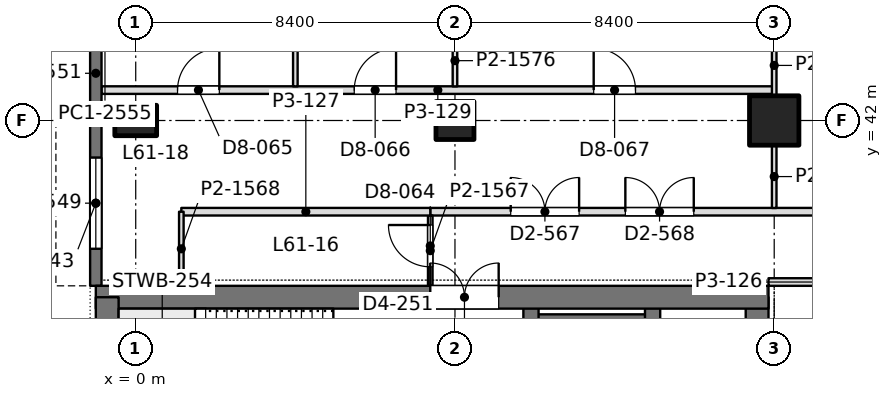
"""IFC4 building model, lengths in metres.
Left out: names, types, materials, properties, quantities, classifications, styles, units other than length and angle.
Written with IfcOpenShell. Run it as: python <this file> out.ifc"""

import sys

from ifc_helpers import new_model, si_unit, direction, frame, frame_2d, origin, origin_2d, place, context, subcontext, project, spatial, rectangle, extrude, element, fill, save


model = new_model("IFC4")
c1 = context("Model", 3, precision=1e-05, world=origin(), true_north=direction((0.0, 1.0)))
c2 = subcontext(c1, "Body", "Model", "MODEL_VIEW")
j1 = project(units=[si_unit("LENGTHUNIT", "METRE"), si_unit("PLANEANGLEUNIT", "RADIAN")], contexts=[c1])
p1 = place(None, origin())
s1 = spatial("IfcSite", under=j1, at=p1, CompositionType="ELEMENT")
p2 = place(p1, origin())
s2 = spatial("IfcBuilding", under=s1, at=p2, CompositionType="ELEMENT")
p3 = place(p2, frame((0.0, 0.0, 268.2)))
s3 = spatial("IfcBuildingStorey", under=s2, at=p3, CompositionType="ELEMENT", Elevation=268.2)
p4 = place(p3, frame((0.0, 42.0, 0.0), z_axis=(0.0, 0.0, 1.0), x_axis=(0.0, 1.0, 0.0)))
e1 = element("IfcColumn", 1, at=p4, inside=s3, PredefinedType="COLUMN", context=c2, shape_type="SweptSolid", body=[
    extrude(rectangle(XDim=0.8, YDim=1.1, at=origin_2d()), origin(), (0.0, 0.0, 1.0), 4.5),
])
p5 = place(p3, frame((8.4, 42.0, 0.0), z_axis=(0.0, 0.0, 1.0), x_axis=(1.0, 0.0, 0.0)))
e2 = element("IfcColumn", 2, at=p5, inside=s3, PredefinedType="COLUMN", context=c2, shape_type="SweptSolid", body=[
    extrude(rectangle(XDim=1.0, YDim=1.0, at=origin_2d()), origin(), (0.0, 0.0, 1.0), 4.5),
])
p6 = place(p3, frame((16.8, 42.0, 0.0), z_axis=(0.0, 0.0, 1.0), x_axis=(1.0, 0.0, 0.0)))
e3 = element("IfcColumn", 3, at=p6, inside=s3, PredefinedType="COLUMN", context=c2, shape_type="SweptSolid", body=[
    extrude(rectangle(XDim=1.3, YDim=1.3, at=origin_2d()), origin(), (0.0, 0.0, 1.0), 4.5),
])
p7 = place(p3, frame((-1.05, 37.35, 0.0), z_axis=(0.0, 0.0, 1.0), x_axis=(1.0, 0.0, 0.0)))
e4 = element("IfcWall", 4, at=p7, inside=s3, PredefinedType="SHEAR", context=c2, shape_type="SweptSolid", body=[
    extrude(rectangle(XDim=17.7, YDim=0.6, at=frame_2d((8.85, 0.0))), origin(), (0.0, 0.0, 1.0), 4.5),
])
p8 = place(p7, frame((8.8, 0.0, 0.0)))
e5 = element("IfcOpeningElement", 5, at=p8, cuts=e4, PredefinedType="OPENING", context=c2, shape_type="SweptSolid", body=[
    extrude(rectangle(XDim=1.8, YDim=2.4, at=frame_2d((0.9, 1.2))), frame((0.0, 0.31, 0.0), z_axis=(0.0, -1.0, 0.0), x_axis=(1.0, 0.0, 0.0)), (0.0, 0.0, 1.0), 0.62),
])
p9 = place(p3, frame((-0.75, 13.05, 0.0), z_axis=(0.0, 0.0, 1.0), x_axis=(0.0, 1.0, 0.0)))
e6 = element("IfcWall", 6, at=p9, inside=s3, PredefinedType="SHEAR", context=c2, shape_type="SweptSolid", body=[
    extrude(rectangle(XDim=24.3, YDim=0.6, at=frame_2d((12.15, 0.0))), origin(), (0.0, 0.0, 1.0), 4.5),
])
p10 = place(p3, frame((16.35, 27.8, 0.0), z_axis=(0.0, 0.0, 1.0), x_axis=(0.0, 1.0, 0.0)))
e7 = element("IfcWall", 7, at=p10, inside=s3, PredefinedType="SHEAR", context=c2, shape_type="SweptSolid", body=[
    extrude(rectangle(XDim=9.55, YDim=0.6, at=frame_2d((4.775, 0.0))), origin(), (0.0, 0.0, 1.0), 4.5),
])
p11 = place(p3, frame((6.9, 13.05, 0.0), z_axis=(0.0, 0.0, 1.0), x_axis=(0.0, 1.0, 0.0)))
e8 = element("IfcWall", 8, at=p11, inside=s3, PredefinedType="SHEAR", context=c2, shape_type="SweptSolid", body=[
    extrude(rectangle(XDim=24.3, YDim=0.4, at=frame_2d((12.15, 0.0))), origin(), (0.0, 0.0, 1.0), 4.5),
])
p12 = place(p11, frame((1.3, 0.0, 0.0)))
e9 = element("IfcOpeningElement", 9, at=p12, cuts=e8, PredefinedType="OPENING", context=c2, shape_type="SweptSolid", body=[
    extrude(rectangle(XDim=1.0, YDim=2.2, at=frame_2d((0.5, 1.1))), frame((0.0, 0.21, 0.0), z_axis=(0.0, -1.0, 0.0), x_axis=(1.0, 0.0, 0.0)), (0.0, 0.0, 1.0), 0.42),
])
p13 = place(p11, frame((22.0, 0.0, 0.0)))
e10 = element("IfcOpeningElement", 10, at=p13, cuts=e8, PredefinedType="OPENING", context=c2, shape_type="SweptSolid", body=[
    extrude(rectangle(XDim=1.0, YDim=2.2, at=frame_2d((0.5, 1.1))), frame((0.0, 0.21, 0.0), z_axis=(0.0, -1.0, 0.0), x_axis=(1.0, 0.0, 0.0)), (0.0, 0.0, 1.0), 0.42),
])
p14 = place(p11, frame((5.55, 0.0, 0.0)))
e11 = element("IfcOpeningElement", 11, at=p14, cuts=e8, PredefinedType="OPENING", context=c2, shape_type="SweptSolid", body=[
    extrude(rectangle(XDim=1.0, YDim=2.2, at=frame_2d((0.5, 1.1))), frame((0.0, 0.21, 0.0), z_axis=(0.0, -1.0, 0.0), x_axis=(1.0, 0.0, 0.0)), (0.0, 0.0, 1.0), 0.42),
])
p15 = place(p11, frame((9.55, 0.0, 0.0)))
e12 = element("IfcOpeningElement", 12, at=p15, cuts=e8, PredefinedType="OPENING", context=c2, shape_type="SweptSolid", body=[
    extrude(rectangle(XDim=1.0, YDim=2.2, at=frame_2d((0.5, 1.1))), frame((0.0, 0.21, 0.0), z_axis=(0.0, -1.0, 0.0), x_axis=(1.0, 0.0, 0.0)), (0.0, 0.0, 1.0), 0.42),
])
p16 = place(p11, frame((12.8, 0.0, 0.0)))
e13 = element("IfcOpeningElement", 13, at=p16, cuts=e8, PredefinedType="OPENING", context=c2, shape_type="SweptSolid", body=[
    extrude(rectangle(XDim=1.1, YDim=2.2, at=frame_2d((0.55, 1.1))), frame((0.0, 0.21, 0.0), z_axis=(0.0, -1.0, 0.0), x_axis=(1.0, 0.0, 0.0)), (0.0, 0.0, 1.0), 0.42),
])
p17 = place(p11, frame((15.538, 0.0, 0.0)))
e14 = element("IfcOpeningElement", 14, at=p17, cuts=e8, PredefinedType="OPENING", context=c2, shape_type="SweptSolid", body=[
    extrude(rectangle(XDim=1.1, YDim=2.2, at=frame_2d((0.55, 1.1))), frame((0.0, 0.21, 0.0), z_axis=(0.0, -1.0, 0.0), x_axis=(1.0, 0.0, 0.0)), (0.0, 0.0, 1.0), 0.42),
])
p18 = place(p11, frame((18.262, 0.0, 0.0)))
e15 = element("IfcOpeningElement", 15, at=p18, cuts=e8, PredefinedType="OPENING", context=c2, shape_type="SweptSolid", body=[
    extrude(rectangle(XDim=1.1, YDim=2.2, at=frame_2d((0.55, 1.1))), frame((0.0, 0.21, 0.0), z_axis=(0.0, -1.0, 0.0), x_axis=(1.0, 0.0, 0.0)), (0.0, 0.0, 1.0), 0.42),
])
p19 = place(p3, frame((10.4, 13.05, 0.0), z_axis=(0.0, 0.0, 1.0), x_axis=(0.0, 1.0, 0.0)))
e16 = element("IfcWall", 16, at=p19, inside=s3, PredefinedType="SHEAR", context=c2, shape_type="SweptSolid", body=[
    extrude(rectangle(XDim=24.3, YDim=0.4, at=frame_2d((12.15, 0.0))), origin(), (0.0, 0.0, 1.0), 4.5),
])
p20 = place(p19, frame((15.75, 0.0, 0.0)))
e17 = element("IfcOpeningElement", 17, at=p20, cuts=e16, PredefinedType="OPENING", context=c2, shape_type="SweptSolid", body=[
    extrude(rectangle(XDim=1.1, YDim=2.2, at=frame_2d((0.55, 1.1))), frame((0.0, 0.21, 0.0), z_axis=(0.0, -1.0, 0.0), x_axis=(1.0, 0.0, 0.0)), (0.0, 0.0, 1.0), 0.42),
])
p21 = place(p19, frame((18.6, 0.0, 0.0)))
e18 = element("IfcOpeningElement", 18, at=p21, cuts=e16, PredefinedType="OPENING", context=c2, shape_type="SweptSolid", body=[
    extrude(rectangle(XDim=1.1, YDim=2.2, at=frame_2d((0.55, 1.1))), frame((0.0, 0.21, 0.0), z_axis=(0.0, -1.0, 0.0), x_axis=(1.0, 0.0, 0.0)), (0.0, 0.0, 1.0), 0.42),
])
p22 = place(p19, frame((21.45, 0.0, 0.0)))
e19 = element("IfcOpeningElement", 19, at=p22, cuts=e16, PredefinedType="OPENING", context=c2, shape_type="SweptSolid", body=[
    extrude(rectangle(XDim=1.1, YDim=2.2, at=frame_2d((0.55, 1.1))), frame((0.0, 0.21, 0.0), z_axis=(0.0, -1.0, 0.0), x_axis=(1.0, 0.0, 0.0)), (0.0, 0.0, 1.0), 0.42),
])
p23 = place(p19, frame((8.65, 0.0, 0.0)))
e20 = element("IfcOpeningElement", 20, at=p23, cuts=e16, PredefinedType="OPENING", context=c2, shape_type="SweptSolid", body=[
    extrude(rectangle(XDim=1.8, YDim=2.4, at=frame_2d((0.9, 1.2))), frame((0.0, 0.21, 0.0), z_axis=(0.0, -1.0, 0.0), x_axis=(1.0, 0.0, 0.0)), (0.0, 0.0, 1.0), 0.42),
])
p24 = place(p3, frame((13.6, 27.925, 0.0), z_axis=(0.0, 0.0, 1.0), x_axis=(0.0, 1.0, 0.0)))
e21 = element("IfcWall", 21, at=p24, inside=s3, PredefinedType="SHEAR", context=c2, shape_type="SweptSolid", body=[
    extrude(rectangle(XDim=9.425, YDim=0.4, at=frame_2d((4.712, 0.0))), origin(), (0.0, 0.0, 1.0), 4.5),
])
p25 = place(p3, frame((10.4, 36.625, 0.0), z_axis=(0.0, 0.0, 1.0), x_axis=(1.0, 0.0, 0.0)))
e22 = element("IfcWall", 22, at=p25, inside=s3, PredefinedType="SHEAR", context=c2, shape_type="SweptSolid", body=[
    extrude(rectangle(XDim=3.2, YDim=0.55, at=frame_2d((1.6, 0.0))), origin(), (0.0, 0.0, 1.0), 4.5),
])
p26 = place(p3, frame((-1.05, 37.65, 0.0), z_axis=(0.0, 0.0, 1.0), x_axis=(0.0, 1.0, 0.0)))
e23 = element("IfcWall", 23, at=p26, inside=s3, PredefinedType="SOLIDWALL", context=c2, shape_type="SweptSolid", body=[
    extrude(rectangle(XDim=4.35, YDim=0.3, at=frame_2d((2.175, 0.0))), origin(), (0.0, 0.0, 1.0), 4.35),
])
p27 = place(p26, frame((0.975, 0.0, 0.9)))
e24 = element("IfcOpeningElement", 24, at=p27, cuts=e23, PredefinedType="OPENING", context=c2, shape_type="SweptSolid", body=[
    extrude(rectangle(XDim=2.4, YDim=1.9, at=frame_2d((1.2, 0.95))), frame((0.0, 0.16, 0.0), z_axis=(0.0, -1.0, 0.0), x_axis=(1.0, 0.0, 0.0)), (0.0, 0.0, 1.0), 0.32),
])
p28 = place(p3, frame((-1.05, 42.0, 0.0), z_axis=(0.0, 0.0, 1.0), x_axis=(0.0, 1.0, 0.0)))
e25 = element("IfcWall", 25, at=p28, inside=s3, PredefinedType="SOLIDWALL", context=c2, shape_type="SweptSolid", body=[
    extrude(rectangle(XDim=2.485, YDim=0.3, at=frame_2d((1.243, 0.0))), origin(), (0.0, 0.0, 1.0), 4.35),
])
p29 = place(p3, frame((-0.902, 42.8, 0.0), z_axis=(0.0, 0.0, 1.0), x_axis=(1.0, 0.0, 0.0)))
e26 = element("IfcWall", 26, at=p29, inside=s3, PredefinedType="PARTITIONING", context=c2, shape_type="SweptSolid", body=[
    extrude(rectangle(XDim=17.702, YDim=0.2, at=frame_2d((8.851, 0.0))), origin(), (0.0, 0.0, 1.0), 3.86),
])
p30 = place(p29, frame((2.002, 0.0, 0.0)))
e27 = element("IfcOpeningElement", 27, at=p30, cuts=e26, PredefinedType="OPENING", context=c2, shape_type="SweptSolid", body=[
    extrude(rectangle(XDim=1.1, YDim=2.4, at=frame_2d((0.55, 1.2))), frame((0.0, 0.11, 0.0), z_axis=(0.0, -1.0, 0.0), x_axis=(1.0, 0.0, 0.0)), (0.0, 0.0, 1.0), 0.22),
])
p31 = place(p29, frame((6.652, 0.0, 0.0)))
e28 = element("IfcOpeningElement", 28, at=p31, cuts=e26, PredefinedType="OPENING", context=c2, shape_type="SweptSolid", body=[
    extrude(rectangle(XDim=1.1, YDim=2.4, at=frame_2d((0.55, 1.2))), frame((0.0, 0.11, 0.0), z_axis=(0.0, -1.0, 0.0), x_axis=(1.0, 0.0, 0.0)), (0.0, 0.0, 1.0), 0.22),
])
p32 = place(p29, frame((12.952, 0.0, 0.0)))
e29 = element("IfcOpeningElement", 29, at=p32, cuts=e26, PredefinedType="OPENING", context=c2, shape_type="SweptSolid", body=[
    extrude(rectangle(XDim=1.1, YDim=2.4, at=frame_2d((0.55, 1.2))), frame((0.0, 0.11, 0.0), z_axis=(0.0, -1.0, 0.0), x_axis=(1.0, 0.0, 0.0)), (0.0, 0.0, 1.0), 0.22),
])
p33 = place(p3, frame((4.2, 42.898, 0.0), z_axis=(0.0, 0.0, 1.0), x_axis=(0.0, 1.0, 0.0)))
e30 = element("IfcWall", 30, at=p33, inside=s3, PredefinedType="PARTITIONING", context=c2, shape_type="SweptSolid", body=[
    extrude(rectangle(XDim=2.804, YDim=0.12, at=frame_2d((1.402, 0.0))), origin(), (0.0, 0.0, 1.0), 3.86),
])
p34 = place(p3, frame((8.4, 42.898, 0.0), z_axis=(0.0, 0.0, 1.0), x_axis=(0.0, 1.0, 0.0)))
e31 = element("IfcWall", 31, at=p34, inside=s3, PredefinedType="PARTITIONING", context=c2, shape_type="SweptSolid", body=[
    extrude(rectangle(XDim=1.353, YDim=0.12, at=frame_2d((0.677, 0.0))), origin(), (0.0, 0.0, 1.0), 3.99),
])
p35 = place(p3, frame((16.8, 42.648, 0.0), z_axis=(0.0, 0.0, 1.0), x_axis=(0.0, 1.0, 0.0)))
e32 = element("IfcWall", 32, at=p35, inside=s3, PredefinedType="PARTITIONING", context=c2, shape_type="SweptSolid", body=[
    extrude(rectangle(XDim=1.603, YDim=0.12, at=frame_2d((0.802, 0.0))), origin(), (0.0, 0.0, 1.0), 3.99),
])
p36 = place(p3, frame((16.8, 39.698, 0.0), z_axis=(0.0, 0.0, 1.0), x_axis=(0.0, 1.0, 0.0)))
e33 = element("IfcWall", 33, at=p36, inside=s3, PredefinedType="PARTITIONING", context=c2, shape_type="SweptSolid", body=[
    extrude(rectangle(XDim=1.653, YDim=0.12, at=frame_2d((0.827, 0.0))), origin(), (0.0, 0.0, 1.0), 3.99),
])
p37 = place(p3, frame((7.748, 39.6, 0.0), z_axis=(0.0, 0.0, 1.0), x_axis=(1.0, 0.0, 0.0)))
e34 = element("IfcWall", 34, at=p37, inside=s3, PredefinedType="PARTITIONING", context=c2, shape_type="SweptSolid", body=[
    extrude(rectangle(XDim=41.452, YDim=0.2, at=frame_2d((20.726, 0.0))), origin(), (0.0, 0.0, 1.0), 3.8),
])
p38 = place(p37, frame((2.119, 0.0, 0.0)))
e35 = element("IfcOpeningElement", 35, at=p38, cuts=e34, PredefinedType="OPENING", context=c2, shape_type="SweptSolid", body=[
    extrude(rectangle(XDim=1.8, YDim=2.2, at=frame_2d((0.9, 1.1))), frame((0.0, 0.11, 0.0), z_axis=(0.0, -1.0, 0.0), x_axis=(1.0, 0.0, 0.0)), (0.0, 0.0, 1.0), 0.22),
])
p39 = place(p37, frame((5.135, 0.0, 0.0)))
e36 = element("IfcOpeningElement", 36, at=p39, cuts=e34, PredefinedType="OPENING", context=c2, shape_type="SweptSolid", body=[
    extrude(rectangle(XDim=1.8, YDim=2.2, at=frame_2d((0.9, 1.1))), frame((0.0, 0.11, 0.0), z_axis=(0.0, -1.0, 0.0), x_axis=(1.0, 0.0, 0.0)), (0.0, 0.0, 1.0), 0.22),
])
p40 = place(p37, frame((12.352, 0.0, 0.0)))
e37 = element("IfcOpeningElement", 37, at=p40, cuts=e34, PredefinedType="OPENING", context=c2, shape_type="SweptSolid", body=[
    extrude(rectangle(XDim=1.8, YDim=2.2, at=frame_2d((0.9, 1.1))), frame((0.0, 0.11, 0.0), z_axis=(0.0, -1.0, 0.0), x_axis=(1.0, 0.0, 0.0)), (0.0, 0.0, 1.0), 0.22),
])
p41 = place(p37, frame((20.752, 0.0, 0.0)))
e38 = element("IfcOpeningElement", 38, at=p41, cuts=e34, PredefinedType="OPENING", context=c2, shape_type="SweptSolid", body=[
    extrude(rectangle(XDim=1.8, YDim=2.2, at=frame_2d((0.9, 1.1))), frame((0.0, 0.11, 0.0), z_axis=(0.0, -1.0, 0.0), x_axis=(1.0, 0.0, 0.0)), (0.0, 0.0, 1.0), 0.22),
])
p42 = place(p37, frame((30.152, 0.0, 0.0)))
e39 = element("IfcOpeningElement", 39, at=p42, cuts=e34, PredefinedType="OPENING", context=c2, shape_type="SweptSolid", body=[
    extrude(rectangle(XDim=1.8, YDim=2.2, at=frame_2d((0.9, 1.1))), frame((0.0, 0.11, 0.0), z_axis=(0.0, -1.0, 0.0), x_axis=(1.0, 0.0, 0.0)), (0.0, 0.0, 1.0), 0.22),
])
p43 = place(p37, frame((35.352, 0.0, 0.0)))
e40 = element("IfcOpeningElement", 40, at=p43, cuts=e34, PredefinedType="OPENING", context=c2, shape_type="SweptSolid", body=[
    extrude(rectangle(XDim=1.8, YDim=2.2, at=frame_2d((0.9, 1.1))), frame((0.0, 0.11, 0.0), z_axis=(0.0, -1.0, 0.0), x_axis=(1.0, 0.0, 0.0)), (0.0, 0.0, 1.0), 0.22),
])
p44 = place(p3, frame((7.75, 37.648, 0.0), z_axis=(0.0, 0.0, 1.0), x_axis=(0.0, 1.0, 0.0)))
e41 = element("IfcWall", 41, at=p44, inside=s3, PredefinedType="PARTITIONING", context=c2, shape_type="SweptSolid", body=[
    extrude(rectangle(XDim=1.854, YDim=0.12, at=frame_2d((0.927, 0.0))), origin(), (0.0, 0.0, 1.0), 4.35),
])
p45 = place(p44, frame((0.502, 0.0, 0.0)))
e42 = element("IfcOpeningElement", 42, at=p45, cuts=e41, PredefinedType="OPENING", context=c2, shape_type="SweptSolid", body=[
    extrude(rectangle(XDim=1.1, YDim=2.4, at=frame_2d((0.55, 1.2))), frame((0.0, 0.07, 0.0), z_axis=(0.0, -1.0, 0.0), x_axis=(1.0, 0.0, 0.0)), (0.0, 0.0, 1.0), 0.14),
])
p46 = place(p3, frame((1.2, 39.6, 0.0), z_axis=(0.0, 0.0, 1.0), x_axis=(1.0, 0.0, 0.0)))
e43 = element("IfcWall", 43, at=p46, inside=s3, PredefinedType="PARTITIONING", context=c2, shape_type="SweptSolid", body=[
    extrude(rectangle(XDim=6.552, YDim=0.2, at=frame_2d((3.276, 0.0))), origin(), (0.0, 0.0, 1.0), 3.99),
])
p47 = place(p3, frame((1.2, 37.648, 0.0), z_axis=(0.0, 0.0, 1.0), x_axis=(0.0, 1.0, 0.0)))
e44 = element("IfcWall", 44, at=p47, inside=s3, PredefinedType="PARTITIONING", context=c2, shape_type="SweptSolid", body=[
    extrude(rectangle(XDim=1.952, YDim=0.12, at=frame_2d((0.976, 0.0))), origin(), (0.0, 0.0, 1.0), 4.35),
])
p48 = place(p3, frame((16.65, 37.75, 0.0), z_axis=(0.0, 0.0, 1.0), x_axis=(1.0, 0.0, 0.0)))
e45 = element("IfcWall", 45, at=p48, inside=s3, PredefinedType="PARTITIONING", context=c2, shape_type="SweptSolid", body=[
    extrude(rectangle(XDim=17.1, YDim=0.2, at=frame_2d((8.55, 0.0))), origin(), (0.0, 0.0, 1.0), 3.8),
])
p49 = place(p48, frame((2.32, 0.0, 0.0)))
e46 = element("IfcOpeningElement", 46, at=p49, cuts=e45, PredefinedType="OPENING", context=c2, shape_type="SweptSolid", body=[
    extrude(rectangle(XDim=1.1, YDim=2.4, at=frame_2d((0.55, 1.2))), frame((0.0, 0.11, 0.0), z_axis=(0.0, -1.0, 0.0), x_axis=(1.0, 0.0, 0.0)), (0.0, 0.0, 1.0), 0.22),
])
p50 = place(p48, frame((10.72, 0.0, 0.0)))
e47 = element("IfcOpeningElement", 47, at=p50, cuts=e45, PredefinedType="OPENING", context=c2, shape_type="SweptSolid", body=[
    extrude(rectangle(XDim=1.1, YDim=2.4, at=frame_2d((0.55, 1.2))), frame((0.0, 0.11, 0.0), z_axis=(0.0, -1.0, 0.0), x_axis=(1.0, 0.0, 0.0)), (0.0, 0.0, 1.0), 0.22),
])
p51 = place(p27, origin())
e48 = element("IfcWindow", 48, at=p51, inside=s3, PartitioningType="SINGLE_PANEL", PredefinedType="WINDOW", context=c2, shape_type="SweptSolid", body=[
    extrude(rectangle(XDim=2.4, YDim=1.9, at=frame_2d((1.2, 0.95))), frame((0.0, 0.03, 0.0), z_axis=(0.0, -1.0, 0.0), x_axis=(1.0, 0.0, 0.0)), (0.0, 0.0, 1.0), 0.06),
])
fill(e24, e48)
p52 = place(p8, origin())
e49 = element("IfcDoor", 49, at=p52, inside=s3, OperationType="DOUBLE_DOOR_SINGLE_SWING", PredefinedType="DOOR", context=c2, shape_type="SweptSolid", body=[
    extrude(rectangle(XDim=1.8, YDim=2.4, at=frame_2d((0.9, 1.2))), frame((0.0, 0.025, 0.0), z_axis=(0.0, -1.0, 0.0), x_axis=(1.0, 0.0, 0.0)), (0.0, 0.0, 1.0), 0.05),
])
fill(e5, e49)
p53 = place(p30, origin())
e50 = element("IfcDoor", 50, at=p53, inside=s3, OperationType="SINGLE_SWING_RIGHT", PredefinedType="DOOR", context=c2, shape_type="SweptSolid", body=[
    extrude(rectangle(XDim=1.1, YDim=2.4, at=frame_2d((0.55, 1.2))), frame((0.0, 0.025, 0.0), z_axis=(0.0, -1.0, 0.0), x_axis=(1.0, 0.0, 0.0)), (0.0, 0.0, 1.0), 0.05),
])
fill(e27, e50)
p54 = place(p31, origin())
e51 = element("IfcDoor", 51, at=p54, inside=s3, OperationType="SINGLE_SWING_RIGHT", PredefinedType="DOOR", context=c2, shape_type="SweptSolid", body=[
    extrude(rectangle(XDim=1.1, YDim=2.4, at=frame_2d((0.55, 1.2))), frame((0.0, 0.025, 0.0), z_axis=(0.0, -1.0, 0.0), x_axis=(1.0, 0.0, 0.0)), (0.0, 0.0, 1.0), 0.05),
])
fill(e28, e51)
p55 = place(p32, origin())
e52 = element("IfcDoor", 52, at=p55, inside=s3, OperationType="SINGLE_SWING_LEFT", PredefinedType="DOOR", context=c2, shape_type="SweptSolid", body=[
    extrude(rectangle(XDim=1.1, YDim=2.4, at=frame_2d((0.55, 1.2))), frame((0.0, 0.025, 0.0), z_axis=(0.0, -1.0, 0.0), x_axis=(1.0, 0.0, 0.0)), (0.0, 0.0, 1.0), 0.05),
])
fill(e29, e52)
p56 = place(p38, origin())
e53 = element("IfcDoor", 53, at=p56, inside=s3, OperationType="DOUBLE_DOOR_SINGLE_SWING", PredefinedType="DOOR", context=c2, shape_type="SweptSolid", body=[
    extrude(rectangle(XDim=1.8, YDim=2.2, at=frame_2d((0.9, 1.1))), frame((0.0, 0.025, 0.0), z_axis=(0.0, -1.0, 0.0), x_axis=(1.0, 0.0, 0.0)), (0.0, 0.0, 1.0), 0.05),
])
fill(e35, e53)
p57 = place(p39, origin())
e54 = element("IfcDoor", 54, at=p57, inside=s3, OperationType="DOUBLE_DOOR_SINGLE_SWING", PredefinedType="DOOR", context=c2, shape_type="SweptSolid", body=[
    extrude(rectangle(XDim=1.8, YDim=2.2, at=frame_2d((0.9, 1.1))), frame((0.0, 0.025, 0.0), z_axis=(0.0, -1.0, 0.0), x_axis=(1.0, 0.0, 0.0)), (0.0, 0.0, 1.0), 0.05),
])
fill(e36, e54)
p58 = place(p45, origin())
e55 = element("IfcDoor", 55, at=p58, inside=s3, OperationType="SINGLE_SWING_RIGHT", PredefinedType="DOOR", context=c2, shape_type="SweptSolid", body=[
    extrude(rectangle(XDim=1.1, YDim=2.4, at=frame_2d((0.55, 1.2))), frame((0.0, 0.025, 0.0), z_axis=(0.0, -1.0, 0.0), x_axis=(1.0, 0.0, 0.0)), (0.0, 0.0, 1.0), 0.05),
])
fill(e42, e55)
save(model, sys.argv[1])
